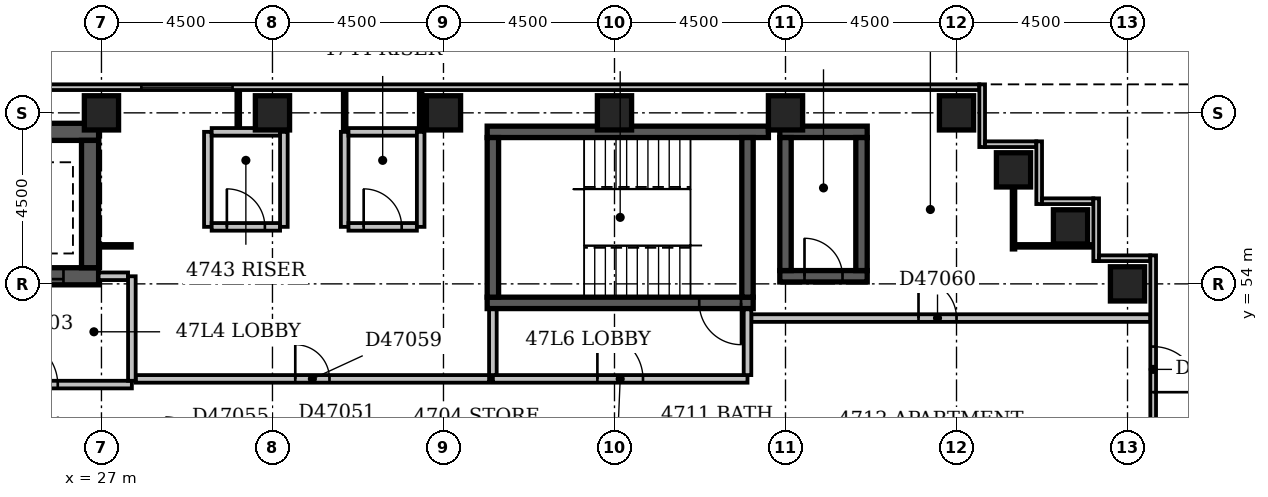
"""IFC4 building model, lengths in metres.
Left out: names, types, materials, properties, quantities, classifications, styles, units other than length and angle.
Written with IfcOpenShell. Run it as: python <this file> out.ifc"""

import sys

from ifc_helpers import new_model, si_unit, direction, frame, frame_2d, origin, origin_2d, place, context, subcontext, project, spatial, rectangle, extrude, element, fill, save


model = new_model("IFC4")
c1 = context("Model", 3, precision=1e-05, world=origin(), true_north=direction((0.0, 1.0)))
c2 = subcontext(c1, "Body", "Model", "MODEL_VIEW")
j1 = project(units=[si_unit("LENGTHUNIT", "METRE"), si_unit("PLANEANGLEUNIT", "RADIAN")], contexts=[c1])
p1 = place(None, origin())
s1 = spatial("IfcSite", under=j1, at=p1, CompositionType="ELEMENT")
p2 = place(p1, origin())
s2 = spatial("IfcBuilding", under=s1, at=p2, CompositionType="ELEMENT")
p3 = place(p2, frame((0.0, 0.0, 186.2)))
s3 = spatial("IfcBuildingStorey", under=s2, at=p3, CompositionType="ELEMENT", Elevation=186.2)
p4 = place(p3, frame((23.975, 54.2, -0.35), z_axis=(0.0, 0.0, 1.0), x_axis=(1.0, 0.0, 0.0)))
e1 = element("IfcWall", 1, at=p4, inside=s3, PredefinedType="SHEAR", context=c2, shape_type="SweptSolid", body=[
    extrude(rectangle(XDim=2.95, YDim=0.45, at=frame_2d((1.475, 0.0))), origin(), (0.0, 0.0, 1.0), 3.65),
])
p5 = place(p4, frame((0.925, 0.0, 0.35)))
e2 = element("IfcOpeningElement", 2, at=p5, cuts=e1, PredefinedType="OPENING", context=c2, shape_type="SweptSolid", body=[
    extrude(rectangle(XDim=1.1, YDim=2.1, at=frame_2d((0.55, 1.05))), frame((0.0, 0.237, 0.0), z_axis=(0.0, -1.0, 0.0), x_axis=(1.0, 0.0, 0.0)), (0.0, 0.0, 1.0), 0.474),
])
p6 = place(p3, frame((23.975, 58.0, -0.35), z_axis=(0.0, 0.0, 1.0), x_axis=(1.0, 0.0, 0.0)))
e3 = element("IfcWall", 3, at=p6, inside=s3, PredefinedType="SHEAR", context=c2, shape_type="SweptSolid", body=[
    extrude(rectangle(XDim=2.95, YDim=0.45, at=frame_2d((1.475, 0.0))), origin(), (0.0, 0.0, 1.0), 3.65),
])
p7 = place(p3, frame((26.7, 54.425, -0.35), z_axis=(0.0, 0.0, 1.0), x_axis=(0.0, 1.0, 0.0)))
e4 = element("IfcWall", 4, at=p7, inside=s3, PredefinedType="SHEAR", context=c2, shape_type="SweptSolid", body=[
    extrude(rectangle(XDim=3.35, YDim=0.45, at=frame_2d((1.675, 0.0))), origin(), (0.0, 0.0, 1.0), 3.65),
])
p8 = place(p3, frame((37.15, 53.5, -0.35), z_axis=(0.0, 0.0, 1.0), x_axis=(1.0, 0.0, 0.0)))
e5 = element("IfcWall", 5, at=p8, inside=s3, PredefinedType="SHEAR", context=c2, shape_type="SweptSolid", body=[
    extrude(rectangle(XDim=7.0, YDim=0.3, at=frame_2d((3.5, 0.0))), origin(), (0.0, 0.0, 1.0), 3.65),
])
p9 = place(p8, frame((5.58, 0.0, 0.35)))
e6 = element("IfcOpeningElement", 6, at=p9, cuts=e5, PredefinedType="OPENING", context=c2, shape_type="SweptSolid", body=[
    extrude(rectangle(XDim=1.1, YDim=2.1, at=frame_2d((0.55, 1.05))), frame((0.0, 0.162, 0.0), z_axis=(0.0, -1.0, 0.0), x_axis=(1.0, 0.0, 0.0)), (0.0, 0.0, 1.0), 0.324),
])
p10 = place(p3, frame((37.15, 58.0, -0.35), z_axis=(0.0, 0.0, 1.0), x_axis=(1.0, 0.0, 0.0)))
e7 = element("IfcWall", 7, at=p10, inside=s3, PredefinedType="SHEAR", context=c2, shape_type="SweptSolid", body=[
    extrude(rectangle(XDim=7.4, YDim=0.3, at=frame_2d((3.7, 0.0))), origin(), (0.0, 0.0, 1.0), 3.65),
])
for number, where, z_axis, x_axis in (
    (8, (37.3, 53.65, -0.35), (0.0, 0.0, 1.0), (0.0, 1.0, 0.0)),
    (9, (44.0, 53.65, -0.35), (0.0, 0.0, 1.0), (0.0, 1.0, 0.0)),
):
    element("IfcWall", number, at=place(p3, frame(where, z_axis=z_axis, x_axis=x_axis)), inside=s3, PredefinedType="SHEAR", context=c2, shape_type="SweptSolid", body=[
        extrude(rectangle(XDim=4.2, YDim=0.3, at=frame_2d((2.1, 0.0))), origin(), (0.0, 0.0, 1.0), 3.65),
    ])
p11 = place(p3, frame((44.85, 54.2, -0.35), z_axis=(0.0, 0.0, 1.0), x_axis=(1.0, 0.0, 0.0)))
e10 = element("IfcWall", 10, at=p11, inside=s3, PredefinedType="SHEAR", context=c2, shape_type="SweptSolid", body=[
    extrude(rectangle(XDim=2.3, YDim=0.3, at=frame_2d((1.15, 0.0))), origin(), (0.0, 0.0, 1.0), 3.65),
])
p12 = place(p11, frame((0.65, 0.0, 0.35)))
e11 = element("IfcOpeningElement", 11, at=p12, cuts=e10, PredefinedType="OPENING", context=c2, shape_type="SweptSolid", body=[
    extrude(rectangle(XDim=1.0, YDim=2.1, at=frame_2d((0.5, 1.05))), frame((0.0, 0.162, 0.0), z_axis=(0.0, -1.0, 0.0), x_axis=(1.0, 0.0, 0.0)), (0.0, 0.0, 1.0), 0.324),
])
p13 = place(p3, frame((44.85, 58.0, -0.35), z_axis=(0.0, 0.0, 1.0), x_axis=(1.0, 0.0, 0.0)))
e12 = element("IfcWall", 12, at=p13, inside=s3, PredefinedType="SHEAR", context=c2, shape_type="SweptSolid", body=[
    extrude(rectangle(XDim=2.3, YDim=0.3, at=frame_2d((1.15, 0.0))), origin(), (0.0, 0.0, 1.0), 3.65),
])
for number, where, z_axis, x_axis in (
    (13, (45.0, 54.35, -0.35), (0.0, 0.0, 1.0), (0.0, 1.0, 0.0)),
    (14, (47.0, 54.35, -0.35), (0.0, 0.0, 1.0), (0.0, 1.0, 0.0)),
):
    element("IfcWall", number, at=place(p3, frame(where, z_axis=z_axis, x_axis=x_axis)), inside=s3, PredefinedType="SHEAR", context=c2, shape_type="SweptSolid", body=[
        extrude(rectangle(XDim=3.5, YDim=0.3, at=frame_2d((1.75, 0.0))), origin(), (0.0, 0.0, 1.0), 3.65),
    ])
for number, where, z_axis, x_axis in (
    (15, (54.0, 54.0, -0.35), (0.0, 0.0, 1.0), (1.0, 0.0, 0.0)),
    (16, (52.5, 55.5, -0.35), (0.0, 0.0, 1.0), (1.0, 0.0, 0.0)),
    (17, (51.0, 57.0, -0.35), (0.0, 0.0, 1.0), (1.0, 0.0, 0.0)),
    (18, (27.0, 58.5, -0.35), (0.0, 0.0, 1.0), (1.0, 0.0, 0.0)),
    (19, (31.5, 58.5, -0.35), (0.0, 0.0, 1.0), (1.0, 0.0, 0.0)),
    (20, (36.0, 58.5, -0.35), (0.0, 0.0, 1.0), (1.0, 0.0, 0.0)),
    (21, (40.5, 58.5, -0.35), (0.0, 0.0, 1.0), (1.0, 0.0, 0.0)),
    (22, (45.0, 58.5, -0.35), (0.0, 0.0, 1.0), (1.0, 0.0, 0.0)),
    (23, (49.5, 58.5, -0.35), (0.0, 0.0, 1.0), (1.0, 0.0, 0.0)),
):
    element("IfcColumn", number, at=place(p3, frame(where, z_axis=z_axis, x_axis=x_axis)), inside=s3, PredefinedType="COLUMN", context=c2, shape_type="SweptSolid", body=[
        extrude(rectangle(XDim=0.9, YDim=0.9, at=origin_2d()), origin(), (0.0, 0.0, 1.0), 3.65),
    ])
p14 = place(p3, frame((54.675, 39.9, 0.0), z_axis=(0.0, 0.0, 1.0), x_axis=(0.0, 1.0, 0.0)))
e24 = element("IfcWall", 24, at=p14, inside=s3, PredefinedType="STANDARD", context=c2, shape_type="SweptSolid", body=[
    extrude(rectangle(XDim=14.85, YDim=0.15, at=frame_2d((7.425, 0.0))), origin(), (0.0, 0.0, 1.0), 2.7),
])
p15 = place(p14, frame((11.25, 0.0, 0.0)))
e25 = element("IfcOpeningElement", 25, at=p15, cuts=e24, PredefinedType="OPENING", context=c2, shape_type="SweptSolid", body=[
    extrude(rectangle(XDim=1.2, YDim=2.4, at=frame_2d((0.6, 1.2))), frame((0.0, 0.087, 0.0), z_axis=(0.0, -1.0, 0.0), x_axis=(1.0, 0.0, 0.0)), (0.0, 0.0, 1.0), 0.174),
])
p16 = place(p3, frame((54.6, 54.675, 0.0), z_axis=(0.0, 0.0, 1.0), x_axis=(-1.0, 0.0, 0.0)))
e26 = element("IfcWall", 26, at=p16, inside=s3, PredefinedType="STANDARD", context=c2, shape_type="SweptSolid", body=[
    extrude(rectangle(XDim=1.35, YDim=0.15, at=frame_2d((0.675, 0.0))), origin(), (0.0, 0.0, 1.0), 2.7),
])
p17 = place(p3, frame((53.175, 54.6, 0.0), z_axis=(0.0, 0.0, 1.0), x_axis=(0.0, 1.0, 0.0)))
e27 = element("IfcWall", 27, at=p17, inside=s3, PredefinedType="STANDARD", context=c2, shape_type="SweptSolid", body=[
    extrude(rectangle(XDim=1.65, YDim=0.15, at=frame_2d((0.825, 0.0))), origin(), (0.0, 0.0, 1.0), 2.7),
])
p18 = place(p3, frame((53.1, 56.175, 0.0), z_axis=(0.0, 0.0, 1.0), x_axis=(-1.0, 0.0, 0.0)))
e28 = element("IfcWall", 28, at=p18, inside=s3, PredefinedType="STANDARD", context=c2, shape_type="SweptSolid", body=[
    extrude(rectangle(XDim=1.35, YDim=0.15, at=frame_2d((0.675, 0.0))), origin(), (0.0, 0.0, 1.0), 2.7),
])
p19 = place(p3, frame((51.675, 56.1, 0.0), z_axis=(0.0, 0.0, 1.0), x_axis=(0.0, 1.0, 0.0)))
e29 = element("IfcWall", 29, at=p19, inside=s3, PredefinedType="STANDARD", context=c2, shape_type="SweptSolid", body=[
    extrude(rectangle(XDim=1.65, YDim=0.15, at=frame_2d((0.825, 0.0))), origin(), (0.0, 0.0, 1.0), 2.7),
])
p20 = place(p3, frame((51.6, 57.675, 0.0), z_axis=(0.0, 0.0, 1.0), x_axis=(-1.0, 0.0, 0.0)))
e30 = element("IfcWall", 30, at=p20, inside=s3, PredefinedType="STANDARD", context=c2, shape_type="SweptSolid", body=[
    extrude(rectangle(XDim=1.35, YDim=0.15, at=frame_2d((0.675, 0.0))), origin(), (0.0, 0.0, 1.0), 2.7),
])
p21 = place(p3, frame((50.175, 57.6, 0.0), z_axis=(0.0, 0.0, 1.0), x_axis=(0.0, 1.0, 0.0)))
e31 = element("IfcWall", 31, at=p21, inside=s3, PredefinedType="STANDARD", context=c2, shape_type="SweptSolid", body=[
    extrude(rectangle(XDim=1.65, YDim=0.15, at=frame_2d((0.825, 0.0))), origin(), (0.0, 0.0, 1.0), 2.7),
])
p22 = place(p3, frame((50.1, 59.175, 0.0), z_axis=(0.0, 0.0, 1.0), x_axis=(-1.0, 0.0, 0.0)))
e32 = element("IfcWall", 32, at=p22, inside=s3, PredefinedType="STANDARD", context=c2, shape_type="SweptSolid", body=[
    extrude(rectangle(XDim=50.85, YDim=0.15, at=frame_2d((25.425, 0.0))), origin(), (0.0, 0.0, 1.0), 2.7),
])
p23 = place(p22, frame((19.65, 0.0, 0.6)))
e33 = element("IfcOpeningElement", 33, at=p23, cuts=e32, PredefinedType="OPENING", context=c2, shape_type="SweptSolid", body=[
    extrude(rectangle(XDim=2.4, YDim=1.8, at=frame_2d((1.2, 0.9))), frame((0.0, 0.087, 0.0), z_axis=(0.0, -1.0, 0.0), x_axis=(1.0, 0.0, 0.0)), (0.0, 0.0, 1.0), 0.174),
])
p24 = place(p3, frame((23.0, 51.35, 0.0), z_axis=(0.0, 0.0, 1.0), x_axis=(1.0, 0.0, 0.0)))
e34 = element("IfcWall", 34, at=p24, inside=s3, PredefinedType="PARTITIONING", context=c2, shape_type="SweptSolid", body=[
    extrude(rectangle(XDim=4.8, YDim=0.2, at=frame_2d((2.4, 0.0))), origin(), (0.0, 0.0, 1.0), 3.3),
])
p25 = place(p24, frame((1.65, 0.0, 0.0)))
e35 = element("IfcOpeningElement", 35, at=p25, cuts=e34, PredefinedType="OPENING", context=c2, shape_type="SweptSolid", body=[
    extrude(rectangle(XDim=1.2, YDim=2.1, at=frame_2d((0.6, 1.05))), frame((0.0, 0.112, 0.0), z_axis=(0.0, -1.0, 0.0), x_axis=(1.0, 0.0, 0.0)), (0.0, 0.0, 1.0), 0.224),
])
p26 = place(p3, frame((27.8, 51.45, 0.0), z_axis=(0.0, 0.0, 1.0), x_axis=(0.0, 1.0, 0.0)))
e36 = element("IfcWall", 36, at=p26, inside=s3, PredefinedType="PARTITIONING", context=c2, shape_type="SweptSolid", body=[
    extrude(rectangle(XDim=2.75, YDim=0.2, at=frame_2d((1.375, 0.0))), origin(), (0.0, 0.0, 1.0), 3.3),
])
p27 = place(p3, frame((26.925, 54.2, 0.0), z_axis=(0.0, 0.0, 1.0), x_axis=(1.0, 0.0, 0.0)))
e37 = element("IfcWall", 37, at=p27, inside=s3, PredefinedType="PARTITIONING", context=c2, shape_type="SweptSolid", body=[
    extrude(rectangle(XDim=0.775, YDim=0.2, at=frame_2d((0.387, 0.0))), origin(), (0.0, 0.0, 1.0), 3.3),
])
p28 = place(p3, frame((37.3, 51.5, 0.0), z_axis=(0.0, 0.0, 1.0), x_axis=(1.0, 0.0, 0.0)))
e38 = element("IfcWall", 38, at=p28, inside=s3, PredefinedType="PARTITIONING", context=c2, shape_type="SweptSolid", body=[
    extrude(rectangle(XDim=6.7, YDim=0.2, at=frame_2d((3.35, 0.0))), origin(), (0.0, 0.0, 1.0), 3.3),
])
p29 = place(p28, frame((2.75, 0.0, 0.0)))
e39 = element("IfcOpeningElement", 39, at=p29, cuts=e38, PredefinedType="OPENING", context=c2, shape_type="SweptSolid", body=[
    extrude(rectangle(XDim=1.2, YDim=2.1, at=frame_2d((0.6, 1.05))), frame((0.0, 0.112, 0.0), z_axis=(0.0, -1.0, 0.0), x_axis=(1.0, 0.0, 0.0)), (0.0, 0.0, 1.0), 0.224),
])
for number, where, z_axis, x_axis in (
    (40, (44.0, 51.6, 0.0), (0.0, 0.0, 1.0), (0.0, 1.0, 0.0)),
    (41, (37.3, 51.6, 0.0), (0.0, 0.0, 1.0), (0.0, 1.0, 0.0)),
):
    element("IfcWall", number, at=place(p3, frame(where, z_axis=z_axis, x_axis=x_axis)), inside=s3, PredefinedType="PARTITIONING", context=c2, shape_type="SweptSolid", body=[
        extrude(rectangle(XDim=1.73, YDim=0.2, at=frame_2d((0.865, 0.0))), origin(), (0.0, 0.0, 1.0), 3.3),
    ])
p30 = place(p3, frame((27.9, 51.5, 0.0), z_axis=(0.0, 0.0, 1.0), x_axis=(1.0, 0.0, 0.0)))
e42 = element("IfcWall", 42, at=p30, inside=s3, PredefinedType="PARTITIONING", context=c2, shape_type="SweptSolid", body=[
    extrude(rectangle(XDim=9.3, YDim=0.2, at=frame_2d((4.65, 0.0))), origin(), (0.0, 0.0, 1.0), 3.3),
])
p31 = place(p30, frame((4.2, 0.0, 0.0)))
e43 = element("IfcOpeningElement", 43, at=p31, cuts=e42, PredefinedType="OPENING", context=c2, shape_type="SweptSolid", body=[
    extrude(rectangle(XDim=0.9, YDim=2.1, at=frame_2d((0.45, 1.05))), frame((0.0, 0.112, 0.0), z_axis=(0.0, -1.0, 0.0), x_axis=(1.0, 0.0, 0.0)), (0.0, 0.0, 1.0), 0.224),
])
p32 = place(p3, frame((44.1, 53.1, 0.0), z_axis=(0.0, 0.0, 1.0), x_axis=(1.0, 0.0, 0.0)))
e44 = element("IfcWall", 44, at=p32, inside=s3, PredefinedType="PARTITIONING", context=c2, shape_type="SweptSolid", body=[
    extrude(rectangle(XDim=10.5, YDim=0.2, at=frame_2d((5.25, 0.0))), origin(), (0.0, 0.0, 1.0), 3.3),
])
p33 = place(p32, frame((4.4, 0.0, 0.0)))
e45 = element("IfcOpeningElement", 45, at=p33, cuts=e44, PredefinedType="OPENING", context=c2, shape_type="SweptSolid", body=[
    extrude(rectangle(XDim=1.0, YDim=2.1, at=frame_2d((0.5, 1.05))), frame((0.0, 0.112, 0.0), z_axis=(0.0, -1.0, 0.0), x_axis=(1.0, 0.0, 0.0)), (0.0, 0.0, 1.0), 0.224),
])
p34 = place(p3, frame((51.0, 54.9, 0.0), z_axis=(0.0, 0.0, 1.0), x_axis=(0.0, 1.0, 0.0)))
e46 = element("IfcWall", 46, at=p34, inside=s3, PredefinedType="PARTITIONING", context=c2, shape_type="SweptSolid", body=[
    extrude(rectangle(XDim=1.65, YDim=0.1, at=frame_2d((0.825, 0.0))), origin(), (0.0, 0.0, 1.0), 3.3),
])
p35 = place(p3, frame((26.925, 55.0, 0.0), z_axis=(0.0, 0.0, 1.0), x_axis=(1.0, 0.0, 0.0)))
e47 = element("IfcWall", 47, at=p35, inside=s3, PredefinedType="PARTITIONING", context=c2, shape_type="SweptSolid", body=[
    extrude(rectangle(XDim=0.875, YDim=0.1, at=frame_2d((0.438, 0.0))), origin(), (0.0, 0.0, 1.0), 3.3),
])
p36 = place(p3, frame((51.05, 55.0, 0.0), z_axis=(0.0, 0.0, 1.0), x_axis=(1.0, 0.0, 0.0)))
e48 = element("IfcWall", 48, at=p36, inside=s3, PredefinedType="PARTITIONING", context=c2, shape_type="SweptSolid", body=[
    extrude(rectangle(XDim=2.05, YDim=0.1, at=frame_2d((1.025, 0.0))), origin(), (0.0, 0.0, 1.0), 3.3),
])
p37 = place(p3, frame((29.8, 55.5, 0.0), z_axis=(0.0, 0.0, 1.0), x_axis=(0.0, 1.0, 0.0)))
e49 = element("IfcWall", 49, at=p37, inside=s3, PredefinedType="PARTITIONING", context=c2, shape_type="SweptSolid", body=[
    extrude(rectangle(XDim=2.5, YDim=0.2, at=frame_2d((1.25, 0.0))), origin(), (0.0, 0.0, 1.0), 3.3),
])
p38 = place(p3, frame((29.9, 55.5, 0.0), z_axis=(0.0, 0.0, 1.0), x_axis=(1.0, 0.0, 0.0)))
e50 = element("IfcWall", 50, at=p38, inside=s3, PredefinedType="PARTITIONING", context=c2, shape_type="SweptSolid", body=[
    extrude(rectangle(XDim=1.8, YDim=0.2, at=frame_2d((0.9, 0.0))), origin(), (0.0, 0.0, 1.0), 3.3),
])
p39 = place(p38, frame((0.4, 0.0, 0.0)))
e51 = element("IfcOpeningElement", 51, at=p39, cuts=e50, PredefinedType="OPENING", context=c2, shape_type="SweptSolid", body=[
    extrude(rectangle(XDim=1.0, YDim=2.1, at=frame_2d((0.5, 1.05))), frame((0.0, 0.112, 0.0), z_axis=(0.0, -1.0, 0.0), x_axis=(1.0, 0.0, 0.0)), (0.0, 0.0, 1.0), 0.224),
])
for number, where, z_axis, x_axis in (
    (52, (31.8, 55.5, 0.0), (0.0, 0.0, 1.0), (0.0, 1.0, 0.0)),
    (53, (33.4, 55.5, 0.0), (0.0, 0.0, 1.0), (0.0, 1.0, 0.0)),
):
    element("IfcWall", number, at=place(p3, frame(where, z_axis=z_axis, x_axis=x_axis)), inside=s3, PredefinedType="PARTITIONING", context=c2, shape_type="SweptSolid", body=[
        extrude(rectangle(XDim=2.5, YDim=0.2, at=frame_2d((1.25, 0.0))), origin(), (0.0, 0.0, 1.0), 3.3),
    ])
p40 = place(p3, frame((33.5, 55.5, 0.0), z_axis=(0.0, 0.0, 1.0), x_axis=(1.0, 0.0, 0.0)))
e54 = element("IfcWall", 54, at=p40, inside=s3, PredefinedType="PARTITIONING", context=c2, shape_type="SweptSolid", body=[
    extrude(rectangle(XDim=1.8, YDim=0.2, at=frame_2d((0.9, 0.0))), origin(), (0.0, 0.0, 1.0), 3.3),
])
p41 = place(p40, frame((0.4, 0.0, 0.0)))
e55 = element("IfcOpeningElement", 55, at=p41, cuts=e54, PredefinedType="OPENING", context=c2, shape_type="SweptSolid", body=[
    extrude(rectangle(XDim=1.0, YDim=2.1, at=frame_2d((0.5, 1.05))), frame((0.0, 0.112, 0.0), z_axis=(0.0, -1.0, 0.0), x_axis=(1.0, 0.0, 0.0)), (0.0, 0.0, 1.0), 0.224),
])
p42 = place(p3, frame((35.4, 55.5, 0.0), z_axis=(0.0, 0.0, 1.0), x_axis=(0.0, 1.0, 0.0)))
e56 = element("IfcWall", 56, at=p42, inside=s3, PredefinedType="PARTITIONING", context=c2, shape_type="SweptSolid", body=[
    extrude(rectangle(XDim=2.5, YDim=0.2, at=frame_2d((1.25, 0.0))), origin(), (0.0, 0.0, 1.0), 2.4),
])
p43 = place(p3, frame((29.9, 58.0, 0.0), z_axis=(0.0, 0.0, 1.0), x_axis=(1.0, 0.0, 0.0)))
e57 = element("IfcWall", 57, at=p43, inside=s3, PredefinedType="PARTITIONING", context=c2, shape_type="SweptSolid", body=[
    extrude(rectangle(XDim=1.8, YDim=0.2, at=frame_2d((0.9, 0.0))), origin(), (0.0, 0.0, 1.0), 3.3),
])
p44 = place(p3, frame((33.4, 58.0, 0.0), z_axis=(0.0, 0.0, 1.0), x_axis=(0.0, 1.0, 0.0)))
e58 = element("IfcWall", 58, at=p44, inside=s3, PredefinedType="PARTITIONING", context=c2, shape_type="SweptSolid", body=[
    extrude(rectangle(XDim=1.1, YDim=0.1, at=frame_2d((0.55, 0.0))), origin(), (0.0, 0.0, 1.0), 3.3),
])
p45 = place(p3, frame((33.5, 58.0, 0.0), z_axis=(0.0, 0.0, 1.0), x_axis=(1.0, 0.0, 0.0)))
e59 = element("IfcWall", 59, at=p45, inside=s3, PredefinedType="PARTITIONING", context=c2, shape_type="SweptSolid", body=[
    extrude(rectangle(XDim=1.8, YDim=0.2, at=frame_2d((0.9, 0.0))), origin(), (0.0, 0.0, 1.0), 3.3),
])
p46 = place(p3, frame((35.4, 58.0, 0.0), z_axis=(0.0, 0.0, 1.0), x_axis=(0.0, 1.0, 0.0)))
e60 = element("IfcWall", 60, at=p46, inside=s3, PredefinedType="PARTITIONING", context=c2, shape_type="SweptSolid", body=[
    extrude(rectangle(XDim=1.1, YDim=0.1, at=frame_2d((0.55, 0.0))), origin(), (0.0, 0.0, 1.0), 2.4),
])
p47 = place(p3, frame((30.6, 58.1, 0.0), z_axis=(0.0, 0.0, 1.0), x_axis=(0.0, 1.0, 0.0)))
e61 = element("IfcWall", 61, at=p47, inside=s3, PredefinedType="PARTITIONING", context=c2, shape_type="SweptSolid", body=[
    extrude(rectangle(XDim=1.0, YDim=0.1, at=frame_2d((0.5, 0.0))), origin(), (0.0, 0.0, 1.0), 3.3),
])
p48 = place(p15, origin())
e62 = element("IfcDoor", 62, at=p48, inside=s3, OperationType="DOUBLE_DOOR_SINGLE_SWING", PredefinedType="DOOR", context=c2, shape_type="SweptSolid", body=[
    extrude(rectangle(XDim=1.2, YDim=2.4, at=frame_2d((0.6, 1.2))), frame((0.0, 0.025, 0.0), z_axis=(0.0, -1.0, 0.0), x_axis=(1.0, 0.0, 0.0)), (0.0, 0.0, 1.0), 0.05),
])
fill(e25, e62)
p49 = place(p23, origin())
e63 = element("IfcWindow", 63, at=p49, inside=s3, PartitioningType="SINGLE_PANEL", PredefinedType="WINDOW", context=c2, shape_type="SweptSolid", body=[
    extrude(rectangle(XDim=2.4, YDim=1.8, at=frame_2d((1.2, 0.9))), frame((0.0, 0.03, 0.0), z_axis=(0.0, -1.0, 0.0), x_axis=(1.0, 0.0, 0.0)), (0.0, 0.0, 1.0), 0.06),
])
fill(e33, e63)
p50 = place(p25, origin())
e64 = element("IfcDoor", 64, at=p50, inside=s3, OperationType="SINGLE_SWING_LEFT", PredefinedType="DOOR", context=c2, shape_type="SweptSolid", body=[
    extrude(rectangle(XDim=1.2, YDim=2.1, at=frame_2d((0.6, 1.05))), frame((0.0, 0.025, 0.0), z_axis=(0.0, -1.0, 0.0), x_axis=(1.0, 0.0, 0.0)), (0.0, 0.0, 1.0), 0.05),
])
fill(e35, e64)
p51 = place(p5, origin())
e65 = element("IfcDoor", 65, at=p51, inside=s3, OperationType="SLIDING_TO_LEFT", PredefinedType="DOOR", context=c2, shape_type="SweptSolid", body=[
    extrude(rectangle(XDim=1.1, YDim=2.1, at=frame_2d((0.55, 1.05))), frame((0.0, 0.025, 0.0), z_axis=(0.0, -1.0, 0.0), x_axis=(1.0, 0.0, 0.0)), (0.0, 0.0, 1.0), 0.05),
])
fill(e2, e65)
p52 = place(p29, origin())
e66 = element("IfcDoor", 66, at=p52, inside=s3, OperationType="SINGLE_SWING_LEFT", PredefinedType="DOOR", context=c2, shape_type="SweptSolid", body=[
    extrude(rectangle(XDim=1.2, YDim=2.1, at=frame_2d((0.6, 1.05))), frame((0.0, 0.025, 0.0), z_axis=(0.0, -1.0, 0.0), x_axis=(1.0, 0.0, 0.0)), (0.0, 0.0, 1.0), 0.05),
])
fill(e39, e66)
p53 = place(p12, origin())
e67 = element("IfcDoor", 67, at=p53, inside=s3, OperationType="SINGLE_SWING_LEFT", PredefinedType="DOOR", context=c2, shape_type="SweptSolid", body=[
    extrude(rectangle(XDim=1.0, YDim=2.1, at=frame_2d((0.5, 1.05))), frame((0.0, 0.025, 0.0), z_axis=(0.0, -1.0, 0.0), x_axis=(1.0, 0.0, 0.0)), (0.0, 0.0, 1.0), 0.05),
])
fill(e11, e67)
p54 = place(p9, origin())
e68 = element("IfcDoor", 68, at=p54, inside=s3, OperationType="SINGLE_SWING_RIGHT", PredefinedType="DOOR", context=c2, shape_type="SweptSolid", body=[
    extrude(rectangle(XDim=1.1, YDim=2.1, at=frame_2d((0.55, 1.05))), frame((0.0, 0.025, 0.0), z_axis=(0.0, -1.0, 0.0), x_axis=(1.0, 0.0, 0.0)), (0.0, 0.0, 1.0), 0.05),
])
fill(e6, e68)
p55 = place(p31, origin())
e69 = element("IfcDoor", 69, at=p55, inside=s3, OperationType="SINGLE_SWING_LEFT", PredefinedType="DOOR", context=c2, shape_type="SweptSolid", body=[
    extrude(rectangle(XDim=0.9, YDim=2.1, at=frame_2d((0.45, 1.05))), frame((0.0, 0.025, 0.0), z_axis=(0.0, -1.0, 0.0), x_axis=(1.0, 0.0, 0.0)), (0.0, 0.0, 1.0), 0.05),
])
fill(e43, e69)
p56 = place(p33, origin())
e70 = element("IfcDoor", 70, at=p56, inside=s3, OperationType="SINGLE_SWING_LEFT", PredefinedType="DOOR", context=c2, shape_type="SweptSolid", body=[
    extrude(rectangle(XDim=1.0, YDim=2.1, at=frame_2d((0.5, 1.05))), frame((0.0, 0.025, 0.0), z_axis=(0.0, -1.0, 0.0), x_axis=(1.0, 0.0, 0.0)), (0.0, 0.0, 1.0), 0.05),
])
fill(e45, e70)
p57 = place(p39, origin())
e71 = element("IfcDoor", 71, at=p57, inside=s3, OperationType="SINGLE_SWING_LEFT", PredefinedType="DOOR", context=c2, shape_type="SweptSolid", body=[
    extrude(rectangle(XDim=1.0, YDim=2.1, at=frame_2d((0.5, 1.05))), frame((0.0, 0.025, 0.0), z_axis=(0.0, -1.0, 0.0), x_axis=(1.0, 0.0, 0.0)), (0.0, 0.0, 1.0), 0.05),
])
fill(e51, e71)
p58 = place(p41, origin())
e72 = element("IfcDoor", 72, at=p58, inside=s3, OperationType="SINGLE_SWING_LEFT", PredefinedType="DOOR", context=c2, shape_type="SweptSolid", body=[
    extrude(rectangle(XDim=1.0, YDim=2.1, at=frame_2d((0.5, 1.05))), frame((0.0, 0.025, 0.0), z_axis=(0.0, -1.0, 0.0), x_axis=(1.0, 0.0, 0.0)), (0.0, 0.0, 1.0), 0.05),
])
fill(e55, e72)
save(model, sys.argv[1])
